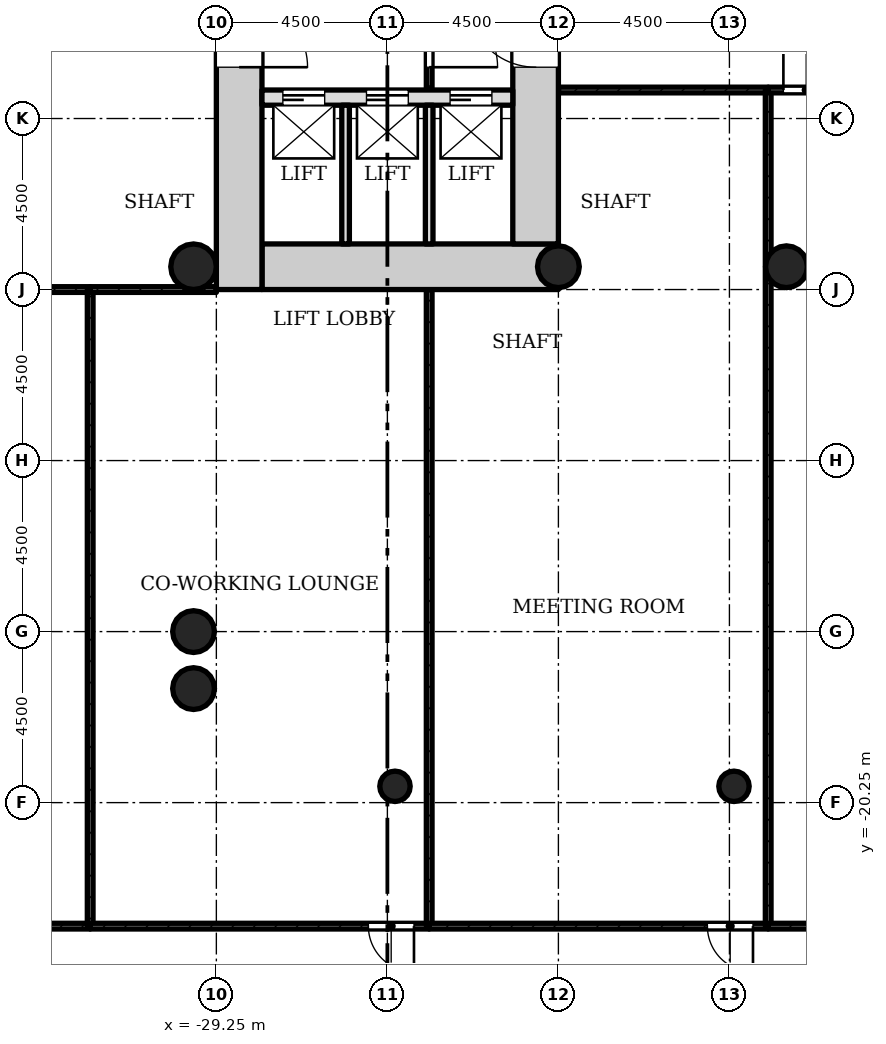
"""IFC4 building model, lengths in metres.
Left out: names, types, materials, properties, quantities, classifications, styles, units other than length and angle.
Written with IfcOpenShell. Run it as: python <this file> out.ifc"""

import sys

from ifc_helpers import new_model, si_unit, direction, frame, frame_2d, origin, origin_2d, place, context, subcontext, project, spatial, rectangle, hollow_circle, extrude, element, fill, save


model = new_model("IFC4")
c1 = context("Model", 3, precision=1e-05, world=origin(), true_north=direction((0.0, 1.0)))
c2 = subcontext(c1, "Body", "Model", "MODEL_VIEW")
j1 = project(units=[si_unit("LENGTHUNIT", "METRE"), si_unit("PLANEANGLEUNIT", "RADIAN")], contexts=[c1])
p1 = place(None, origin())
s1 = spatial("IfcSite", under=j1, at=p1, CompositionType="ELEMENT")
p2 = place(p1, origin())
s2 = spatial("IfcBuilding", under=s1, at=p2, CompositionType="ELEMENT")
p3 = place(p2, frame((0.0, 0.0, 20.0)))
s3 = spatial("IfcBuildingStorey", under=s2, at=p3, CompositionType="ELEMENT", Elevation=20.0)
p4 = place(p3, frame((-28.05, -6.15, 0.0), z_axis=(0.0, 0.0, 1.0), x_axis=(1.0, 0.0, 0.0)))
e1 = element("IfcWall", 1, at=p4, inside=s3, PredefinedType="SHEAR", context=c2, shape_type="SweptSolid", body=[
    extrude(rectangle(XDim=7.8, YDim=1.2, at=frame_2d((3.9, 0.0))), origin(), (0.0, 0.0, 1.0), 4.5),
])
p5 = place(p3, frame((-20.85, -5.55, 0.0), z_axis=(0.0, 0.0, 1.0), x_axis=(0.0, 1.0, 0.0)))
e2 = element("IfcWall", 2, at=p5, inside=s3, PredefinedType="SHEAR", context=c2, shape_type="SweptSolid", body=[
    extrude(rectangle(XDim=12.3, YDim=1.2, at=frame_2d((6.15, 0.0))), origin(), (0.0, 0.0, 1.0), 4.5),
])
p6 = place(p5, frame((4.65, 0.0, 0.0)))
e3 = element("IfcOpeningElement", 3, at=p6, cuts=e2, PredefinedType="OPENING", context=c2, shape_type="SweptSolid", body=[
    extrude(rectangle(XDim=1.8, YDim=2.1, at=frame_2d((0.9, 1.05))), frame((0.0, 0.61, 0.0), z_axis=(0.0, -1.0, 0.0), x_axis=(1.0, 0.0, 0.0)), (0.0, 0.0, 1.0), 1.22),
])
p7 = place(p3, frame((-28.65, 5.55, 0.0), z_axis=(0.0, 0.0, 1.0), x_axis=(0.0, -1.0, 0.0)))
e4 = element("IfcWall", 4, at=p7, inside=s3, PredefinedType="SHEAR", context=c2, shape_type="SweptSolid", body=[
    extrude(rectangle(XDim=12.3, YDim=1.2, at=frame_2d((6.15, 0.0))), origin(), (0.0, 0.0, 1.0), 4.5),
])
p8 = place(p7, frame((4.65, 0.0, 0.0)))
e5 = element("IfcOpeningElement", 5, at=p8, cuts=e4, PredefinedType="OPENING", context=c2, shape_type="SweptSolid", body=[
    extrude(rectangle(XDim=1.8, YDim=2.1, at=frame_2d((0.9, 1.05))), frame((0.0, 0.61, 0.0), z_axis=(0.0, -1.0, 0.0), x_axis=(1.0, 0.0, 0.0)), (0.0, 0.0, 1.0), 1.22),
])
p9 = place(p3, frame((-28.05, -1.7, 0.0), z_axis=(0.0, 0.0, 1.0), x_axis=(1.0, 0.0, 0.0)))
e6 = element("IfcWall", 6, at=p9, inside=s3, PredefinedType="SHEAR", context=c2, shape_type="SweptSolid", body=[
    extrude(rectangle(XDim=6.6, YDim=0.4, at=frame_2d((3.3, 0.0))), origin(), (0.0, 0.0, 1.0), 4.5),
])
p10 = place(p9, frame((0.55, 0.0, 0.0)))
e7 = element("IfcOpeningElement", 7, at=p10, cuts=e6, PredefinedType="OPENING", context=c2, shape_type="SweptSolid", body=[
    extrude(rectangle(XDim=1.1, YDim=2.1, at=frame_2d((0.55, 1.05))), frame((0.0, 0.21, 0.0), z_axis=(0.0, -1.0, 0.0), x_axis=(1.0, 0.0, 0.0)), (0.0, 0.0, 1.0), 0.42),
])
p11 = place(p9, frame((2.75, 0.0, 0.0)))
e8 = element("IfcOpeningElement", 8, at=p11, cuts=e6, PredefinedType="OPENING", context=c2, shape_type="SweptSolid", body=[
    extrude(rectangle(XDim=1.1, YDim=2.1, at=frame_2d((0.55, 1.05))), frame((0.0, 0.21, 0.0), z_axis=(0.0, -1.0, 0.0), x_axis=(1.0, 0.0, 0.0)), (0.0, 0.0, 1.0), 0.42),
])
p12 = place(p9, frame((4.95, 0.0, 0.0)))
e9 = element("IfcOpeningElement", 9, at=p12, cuts=e6, PredefinedType="OPENING", context=c2, shape_type="SweptSolid", body=[
    extrude(rectangle(XDim=1.1, YDim=2.1, at=frame_2d((0.55, 1.05))), frame((0.0, 0.21, 0.0), z_axis=(0.0, -1.0, 0.0), x_axis=(1.0, 0.0, 0.0)), (0.0, 0.0, 1.0), 0.42),
])
for number, where, z_axis, x_axis in (
    (10, (-20.25, -6.15, 0.0), (0.0, 0.0, 1.0), (1.0, 0.0, 0.0)),
    (11, (-14.25, -6.15, 0.0), (0.0, 0.0, 1.0), (1.0, 0.0, 0.0)),
    (12, (-29.85, -15.75, 0.0), (0.0, 0.0, 1.0), (1.0, 0.0, 0.0)),
    (13, (-29.85, -17.25, 0.0), (0.0, 0.0, 1.0), (1.0, 0.0, 0.0)),
):
    element("IfcColumn", number, at=place(p3, frame(where, z_axis=z_axis, x_axis=x_axis)), inside=s3, PredefinedType="COLUMN", context=c2, shape_type="SweptSolid", body=[
        extrude(hollow_circle(Radius=0.55, WallThickness=0.04, at=origin_2d()), origin(), (0.0, 0.0, 1.0), 4.5),
    ])
p13 = place(p3, frame((-29.85, -6.15, 0.0), z_axis=(0.0, 0.0, 1.0), x_axis=(1.0, 0.0, 0.0)))
e14 = element("IfcColumn", 14, at=p13, inside=s3, PredefinedType="COLUMN", context=c2, shape_type="SweptSolid", body=[
    extrude(hollow_circle(Radius=0.6, WallThickness=0.045, at=origin_2d()), origin(), (0.0, 0.0, 1.0), 4.5),
])
for number, where, z_axis, x_axis in (
    (15, (-24.55, -19.821, 0.0), (0.0, 0.0, 1.0), (1.0, 0.0, 0.0)),
    (16, (-15.63, -19.821, 0.0), (0.0, 0.0, 1.0), (1.0, 0.0, 0.0)),
):
    element("IfcColumn", number, at=place(p3, frame(where, z_axis=z_axis, x_axis=x_axis)), inside=s3, PredefinedType="COLUMN", context=c2, shape_type="SweptSolid", body=[
        extrude(hollow_circle(Radius=0.4, WallThickness=0.028, at=origin_2d()), origin(), (0.0, 0.0, 1.0), 4.08),
    ])
p14 = place(p3, frame((-23.65, -1.5, 0.0), z_axis=(0.0, 0.0, 1.0), x_axis=(0.0, 1.0, 0.0)))
e17 = element("IfcWall", 17, at=p14, inside=s3, PredefinedType="PARTITIONING", context=c2, shape_type="SweptSolid", body=[
    extrude(rectangle(XDim=3.0, YDim=0.15, at=frame_2d((1.5, 0.0))), origin(), (0.0, 0.0, 1.0), 4.075),
])
p15 = place(p14, frame((0.6, 0.0, 0.0)))
e18 = element("IfcOpeningElement", 18, at=p15, cuts=e17, PredefinedType="OPENING", context=c2, shape_type="SweptSolid", body=[
    extrude(rectangle(XDim=1.8, YDim=2.1, at=frame_2d((0.9, 1.05))), frame((0.0, 0.085, 0.0), z_axis=(0.0, -1.0, 0.0), x_axis=(1.0, 0.0, 0.0)), (0.0, 0.0, 1.0), 0.17),
])
for number, where, z_axis, x_axis in (
    (19, (-25.85, -5.55, 0.0), (0.0, 0.0, 1.0), (0.0, 1.0, 0.0)),
    (20, (-23.65, -5.55, 0.0), (0.0, 0.0, 1.0), (0.0, 1.0, 0.0)),
):
    element("IfcWall", number, at=place(p3, frame(where, z_axis=z_axis, x_axis=x_axis)), inside=s3, PredefinedType="SOLIDWALL", context=c2, shape_type="SweptSolid", body=[
        extrude(rectangle(XDim=3.65, YDim=0.2, at=frame_2d((1.825, 0.0))), origin(), (0.0, 0.0, 1.0), 4.075),
    ])
p16 = place(p3, frame((-41.49, -6.75, 0.0), z_axis=(0.0, 0.0, 1.0), x_axis=(1.0, 0.0, 0.0)))
e21 = element("IfcWall", 21, at=p16, inside=s3, PredefinedType="PARTITIONING", context=c2, shape_type="SweptSolid", body=[
    extrude(rectangle(XDim=8.92, YDim=0.15, at=frame_2d((4.46, 0.0))), origin(), (0.0, 0.0, 1.0), 4.075),
])
p17 = place(p16, frame((1.0, 0.0, 0.0)))
e22 = element("IfcOpeningElement", 22, at=p17, cuts=e21, PredefinedType="OPENING", context=c2, shape_type="SweptSolid", body=[
    extrude(rectangle(XDim=1.2, YDim=2.1, at=frame_2d((0.6, 1.05))), frame((0.0, 0.085, 0.0), z_axis=(0.0, -1.0, 0.0), x_axis=(1.0, 0.0, 0.0)), (0.0, 0.0, 1.0), 0.17),
])
p18 = place(p3, frame((-32.57, -23.5, 0.0), z_axis=(0.0, 0.0, 1.0), x_axis=(-1.0, 0.0, 0.0)))
e23 = element("IfcWall", 23, at=p18, inside=s3, PredefinedType="PARTITIONING", context=c2, shape_type="SweptSolid", body=[
    extrude(rectangle(XDim=8.92, YDim=0.15, at=frame_2d((4.46, 0.0))), origin(), (0.0, 0.0, 1.0), 4.075),
])
p19 = place(p3, frame((-32.57, -6.75, 0.0), z_axis=(0.0, 0.0, 1.0), x_axis=(0.0, -1.0, 0.0)))
e24 = element("IfcWall", 24, at=p19, inside=s3, PredefinedType="PARTITIONING", context=c2, shape_type="SweptSolid", body=[
    extrude(rectangle(XDim=16.75, YDim=0.15, at=frame_2d((8.375, 0.0))), origin(), (0.0, 0.0, 1.0), 4.075),
])
p20 = place(p3, frame((-32.57, -6.75, 0.0), z_axis=(0.0, 0.0, 1.0), x_axis=(1.0, 0.0, 0.0)))
e25 = element("IfcWall", 25, at=p20, inside=s3, PredefinedType="PARTITIONING", context=c2, shape_type="SweptSolid", body=[
    extrude(rectangle(XDim=3.32, YDim=0.15, at=frame_2d((1.66, 0.0))), origin(), (0.0, 0.0, 1.0), 4.075),
])
p21 = place(p3, frame((-23.65, -23.5, 0.0), z_axis=(0.0, 0.0, 1.0), x_axis=(-1.0, 0.0, 0.0)))
e26 = element("IfcWall", 26, at=p21, inside=s3, PredefinedType="PARTITIONING", context=c2, shape_type="SweptSolid", body=[
    extrude(rectangle(XDim=8.92, YDim=0.15, at=frame_2d((4.46, 0.0))), origin(), (0.0, 0.0, 1.0), 4.075),
])
p22 = place(p21, frame((0.4, 0.0, 0.0)))
e27 = element("IfcOpeningElement", 27, at=p22, cuts=e26, PredefinedType="OPENING", context=c2, shape_type="SweptSolid", body=[
    extrude(rectangle(XDim=1.2, YDim=2.1, at=frame_2d((0.6, 1.05))), frame((0.0, 0.085, 0.0), z_axis=(0.0, -1.0, 0.0), x_axis=(1.0, 0.0, 0.0)), (0.0, 0.0, 1.0), 0.17),
])
p23 = place(p3, frame((-23.65, -6.75, 0.0), z_axis=(0.0, 0.0, 1.0), x_axis=(0.0, -1.0, 0.0)))
e28 = element("IfcWall", 28, at=p23, inside=s3, PredefinedType="PARTITIONING", context=c2, shape_type="SweptSolid", body=[
    extrude(rectangle(XDim=16.75, YDim=0.15, at=frame_2d((8.375, 0.0))), origin(), (0.0, 0.0, 1.0), 4.075),
])
p24 = place(p3, frame((-20.25, -1.5, 0.0), z_axis=(0.0, 0.0, 1.0), x_axis=(1.0, 0.0, 0.0)))
e29 = element("IfcWall", 29, at=p24, inside=s3, PredefinedType="PARTITIONING", context=c2, shape_type="SweptSolid", body=[
    extrude(rectangle(XDim=5.52, YDim=0.15, at=frame_2d((2.76, 0.0))), origin(), (0.0, 0.0, 1.0), 4.075),
])
p25 = place(p3, frame((-14.73, -23.5, 0.0), z_axis=(0.0, 0.0, 1.0), x_axis=(-1.0, 0.0, 0.0)))
e30 = element("IfcWall", 30, at=p25, inside=s3, PredefinedType="PARTITIONING", context=c2, shape_type="SweptSolid", body=[
    extrude(rectangle(XDim=8.92, YDim=0.15, at=frame_2d((4.46, 0.0))), origin(), (0.0, 0.0, 1.0), 4.075),
])
p26 = place(p25, frame((0.4, 0.0, 0.0)))
e31 = element("IfcOpeningElement", 31, at=p26, cuts=e30, PredefinedType="OPENING", context=c2, shape_type="SweptSolid", body=[
    extrude(rectangle(XDim=1.2, YDim=2.1, at=frame_2d((0.6, 1.05))), frame((0.0, 0.085, 0.0), z_axis=(0.0, -1.0, 0.0), x_axis=(1.0, 0.0, 0.0)), (0.0, 0.0, 1.0), 0.17),
])
p27 = place(p3, frame((-14.73, -1.5, 0.0), z_axis=(0.0, 0.0, 1.0), x_axis=(0.0, -1.0, 0.0)))
e32 = element("IfcWall", 32, at=p27, inside=s3, PredefinedType="PARTITIONING", context=c2, shape_type="SweptSolid", body=[
    extrude(rectangle(XDim=22.0, YDim=0.15, at=frame_2d((11.0, 0.0))), origin(), (0.0, 0.0, 1.0), 4.075),
])
p28 = place(p3, frame((-14.73, -1.5, 0.0), z_axis=(0.0, 0.0, 1.0), x_axis=(1.0, 0.0, 0.0)))
e33 = element("IfcWall", 33, at=p28, inside=s3, PredefinedType="PARTITIONING", context=c2, shape_type="SweptSolid", body=[
    extrude(rectangle(XDim=8.92, YDim=0.15, at=frame_2d((4.46, 0.0))), origin(), (0.0, 0.0, 1.0), 4.075),
])
p29 = place(p28, frame((0.4, 0.0, 0.0)))
e34 = element("IfcOpeningElement", 34, at=p29, cuts=e33, PredefinedType="OPENING", context=c2, shape_type="SweptSolid", body=[
    extrude(rectangle(XDim=1.2, YDim=2.1, at=frame_2d((0.6, 1.05))), frame((0.0, 0.085, 0.0), z_axis=(0.0, -1.0, 0.0), x_axis=(1.0, 0.0, 0.0)), (0.0, 0.0, 1.0), 0.17),
])
p30 = place(p3, frame((-5.81, -23.5, 0.0), z_axis=(0.0, 0.0, 1.0), x_axis=(-1.0, 0.0, 0.0)))
e35 = element("IfcWall", 35, at=p30, inside=s3, PredefinedType="PARTITIONING", context=c2, shape_type="SweptSolid", body=[
    extrude(rectangle(XDim=8.92, YDim=0.15, at=frame_2d((4.46, 0.0))), origin(), (0.0, 0.0, 1.0), 4.075),
])
p31 = place(p15, origin())
e36 = element("IfcDoor", 36, at=p31, inside=s3, OperationType="SINGLE_SWING_LEFT", PredefinedType="DOOR", context=c2, shape_type="SweptSolid", body=[
    extrude(rectangle(XDim=1.8, YDim=2.1, at=frame_2d((0.9, 1.05))), frame((0.0, 0.025, 0.0), z_axis=(0.0, -1.0, 0.0), x_axis=(1.0, 0.0, 0.0)), (0.0, 0.0, 1.0), 0.05),
])
fill(e18, e36)
p32 = place(p22, origin())
e37 = element("IfcDoor", 37, at=p32, inside=s3, OperationType="SINGLE_SWING_RIGHT", PredefinedType="DOOR", context=c2, shape_type="SweptSolid", body=[
    extrude(rectangle(XDim=1.2, YDim=2.1, at=frame_2d((0.6, 1.05))), frame((0.0, 0.025, 0.0), z_axis=(0.0, -1.0, 0.0), x_axis=(1.0, 0.0, 0.0)), (0.0, 0.0, 1.0), 0.05),
])
fill(e27, e37)
p33 = place(p26, origin())
e38 = element("IfcDoor", 38, at=p33, inside=s3, OperationType="SINGLE_SWING_RIGHT", PredefinedType="DOOR", context=c2, shape_type="SweptSolid", body=[
    extrude(rectangle(XDim=1.2, YDim=2.1, at=frame_2d((0.6, 1.05))), frame((0.0, 0.025, 0.0), z_axis=(0.0, -1.0, 0.0), x_axis=(1.0, 0.0, 0.0)), (0.0, 0.0, 1.0), 0.05),
])
fill(e31, e38)
p34 = place(p29, origin())
e39 = element("IfcDoor", 39, at=p34, inside=s3, OperationType="SINGLE_SWING_RIGHT", PredefinedType="DOOR", context=c2, shape_type="SweptSolid", body=[
    extrude(rectangle(XDim=1.2, YDim=2.1, at=frame_2d((0.6, 1.05))), frame((0.0, 0.025, 0.0), z_axis=(0.0, -1.0, 0.0), x_axis=(1.0, 0.0, 0.0)), (0.0, 0.0, 1.0), 0.05),
])
fill(e34, e39)
p35 = place(p10, origin())
e40 = element("IfcDoor", 40, at=p35, inside=s3, OperationType="SLIDING_TO_LEFT", PredefinedType="DOOR", context=c2, shape_type="SweptSolid", body=[
    extrude(rectangle(XDim=1.1, YDim=2.1, at=frame_2d((0.55, 1.05))), frame((0.0, 0.025, 0.0), z_axis=(0.0, -1.0, 0.0), x_axis=(1.0, 0.0, 0.0)), (0.0, 0.0, 1.0), 0.05),
])
fill(e7, e40)
p36 = place(p11, origin())
e41 = element("IfcDoor", 41, at=p36, inside=s3, OperationType="SLIDING_TO_LEFT", PredefinedType="DOOR", context=c2, shape_type="SweptSolid", body=[
    extrude(rectangle(XDim=1.1, YDim=2.1, at=frame_2d((0.55, 1.05))), frame((0.0, 0.025, 0.0), z_axis=(0.0, -1.0, 0.0), x_axis=(1.0, 0.0, 0.0)), (0.0, 0.0, 1.0), 0.05),
])
fill(e8, e41)
p37 = place(p12, origin())
e42 = element("IfcDoor", 42, at=p37, inside=s3, OperationType="SLIDING_TO_LEFT", PredefinedType="DOOR", context=c2, shape_type="SweptSolid", body=[
    extrude(rectangle(XDim=1.1, YDim=2.1, at=frame_2d((0.55, 1.05))), frame((0.0, 0.025, 0.0), z_axis=(0.0, -1.0, 0.0), x_axis=(1.0, 0.0, 0.0)), (0.0, 0.0, 1.0), 0.05),
])
fill(e9, e42)
p38 = place(p8, origin())
e43 = element("IfcDoor", 43, at=p38, inside=s3, OperationType="SINGLE_SWING_LEFT", PredefinedType="DOOR", context=c2, shape_type="SweptSolid", body=[
    extrude(rectangle(XDim=1.8, YDim=2.1, at=frame_2d((0.9, 1.05))), frame((0.0, 0.025, 0.0), z_axis=(0.0, -1.0, 0.0), x_axis=(1.0, 0.0, 0.0)), (0.0, 0.0, 1.0), 0.05),
])
fill(e5, e43)
p39 = place(p6, origin())
e44 = element("IfcDoor", 44, at=p39, inside=s3, OperationType="SINGLE_SWING_LEFT", PredefinedType="DOOR", context=c2, shape_type="SweptSolid", body=[
    extrude(rectangle(XDim=1.8, YDim=2.1, at=frame_2d((0.9, 1.05))), frame((0.0, 0.025, 0.0), z_axis=(0.0, -1.0, 0.0), x_axis=(1.0, 0.0, 0.0)), (0.0, 0.0, 1.0), 0.05),
])
fill(e3, e44)
save(model, sys.argv[1])
